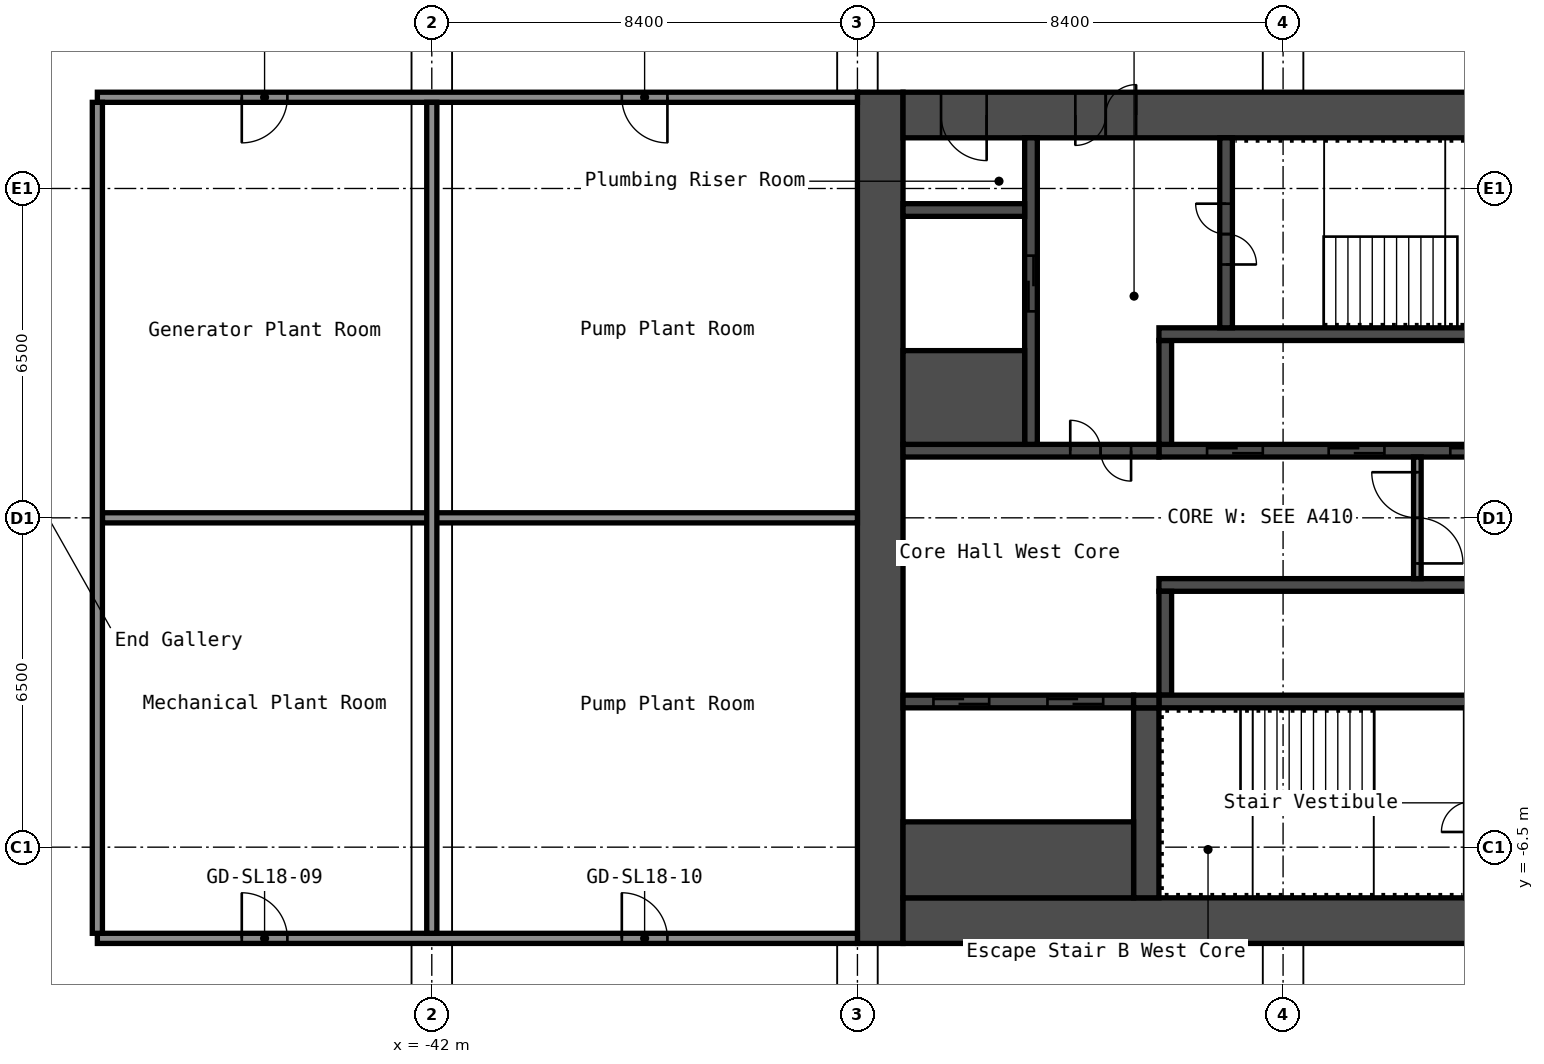
"""IFC4 building model, lengths in metres.
Left out: names, types, materials, properties, quantities, classifications, styles, units other than length and angle.
Written with IfcOpenShell. Run it as: python <this file> out.ifc"""

import sys

from ifc_helpers import new_model, si_unit, direction, frame, frame_2d, origin, place, context, subcontext, project, spatial, rectangle, extrude, element, fill, save


model = new_model("IFC4")
c1 = context("Model", 3, precision=1e-05, world=origin(), true_north=direction((0.0, 1.0)))
c2 = subcontext(c1, "Body", "Model", "MODEL_VIEW")
j1 = project(units=[si_unit("LENGTHUNIT", "METRE"), si_unit("PLANEANGLEUNIT", "RADIAN")], contexts=[c1])
p1 = place(None, origin())
s1 = spatial("IfcSite", under=j1, at=p1, CompositionType="ELEMENT")
p2 = place(p1, origin())
s2 = spatial("IfcBuilding", under=s1, at=p2, CompositionType="ELEMENT")
p3 = place(p2, frame((0.0, 0.0, 64.6)))
s3 = spatial("IfcBuildingStorey", under=s2, at=p3, CompositionType="ELEMENT", Elevation=64.6)
p4 = place(p3, frame((-33.15, -8.4, 0.0), z_axis=(0.0, 0.0, 1.0), x_axis=(0.0, 1.0, 0.0)))
e1 = element("IfcWall", 1, at=p4, inside=s3, PredefinedType="SHEAR", context=c2, shape_type="SweptSolid", body=[
    extrude(rectangle(XDim=16.8, YDim=0.9, at=frame_2d((8.4, 0.0))), origin(), (0.0, 0.0, 1.0), 4.1),
])
p5 = place(p3, frame((-32.7, 7.95, 0.0), z_axis=(0.0, 0.0, 1.0), x_axis=(1.0, 0.0, 0.0)))
e2 = element("IfcWall", 2, at=p5, inside=s3, PredefinedType="SHEAR", context=c2, shape_type="SweptSolid", body=[
    extrude(rectangle(XDim=15.0, YDim=0.9, at=frame_2d((7.5, 0.0))), origin(), (0.0, 0.0, 1.0), 4.1),
])
p6 = place(p5, frame((3.4, 0.0, 0.0)))
e3 = element("IfcOpeningElement", 3, at=p6, cuts=e2, PredefinedType="OPENING", context=c2, shape_type="SweptSolid", body=[
    extrude(rectangle(XDim=1.2, YDim=2.1, at=frame_2d((0.6, 1.05))), frame((0.0, 0.46, 0.0), z_axis=(0.0, -1.0, 0.0), x_axis=(1.0, 0.0, 0.0)), (0.0, 0.0, 1.0), 0.92),
])
p7 = place(p5, frame((0.75, 0.0, 0.0)))
e4 = element("IfcOpeningElement", 4, at=p7, cuts=e2, PredefinedType="OPENING", context=c2, shape_type="SweptSolid", body=[
    extrude(rectangle(XDim=0.9, YDim=2.1, at=frame_2d((0.45, 1.05))), frame((0.0, 0.46, 0.0), z_axis=(0.0, -1.0, 0.0), x_axis=(1.0, 0.0, 0.0)), (0.0, 0.0, 1.0), 0.92),
])
p8 = place(p3, frame((-32.7, -7.95, 0.0), z_axis=(0.0, 0.0, 1.0), x_axis=(1.0, 0.0, 0.0)))
e5 = element("IfcWall", 5, at=p8, inside=s3, PredefinedType="SHEAR", context=c2, shape_type="SweptSolid", body=[
    extrude(rectangle(XDim=15.0, YDim=0.9, at=frame_2d((7.5, 0.0))), origin(), (0.0, 0.0, 1.0), 4.1),
])
p9 = place(p8, frame((11.45, 0.0, 0.0)))
e6 = element("IfcOpeningElement", 6, at=p9, cuts=e5, PredefinedType="OPENING", context=c2, shape_type="SweptSolid", body=[
    extrude(rectangle(XDim=1.0, YDim=2.1, at=frame_2d((0.5, 1.05))), frame((0.0, 0.46, 0.0), z_axis=(0.0, -1.0, 0.0), x_axis=(1.0, 0.0, 0.0)), (0.0, 0.0, 1.0), 0.92),
])
p10 = place(p3, frame((-27.65, 1.325, 0.0), z_axis=(0.0, 0.0, 1.0), x_axis=(1.0, 0.0, 0.0)))
e7 = element("IfcWall", 7, at=p10, inside=s3, PredefinedType="SHEAR", context=c2, shape_type="SweptSolid", body=[
    extrude(rectangle(XDim=7.5, YDim=0.25, at=frame_2d((3.75, 0.0))), origin(), (0.0, 0.0, 1.0), 4.1),
])
p11 = place(p10, frame((5.75, 0.0, 0.0)))
e8 = element("IfcOpeningElement", 8, at=p11, cuts=e7, PredefinedType="OPENING", context=c2, shape_type="SweptSolid", body=[
    extrude(rectangle(XDim=1.1, YDim=2.1, at=frame_2d((0.55, 1.05))), frame((0.0, 0.135, 0.0), z_axis=(0.0, -1.0, 0.0), x_axis=(1.0, 0.0, 0.0)), (0.0, 0.0, 1.0), 0.27),
])
p12 = place(p10, frame((3.35, 0.0, 0.0)))
e9 = element("IfcOpeningElement", 9, at=p12, cuts=e7, PredefinedType="OPENING", context=c2, shape_type="SweptSolid", body=[
    extrude(rectangle(XDim=1.1, YDim=2.1, at=frame_2d((0.55, 1.05))), frame((0.0, 0.135, 0.0), z_axis=(0.0, -1.0, 0.0), x_axis=(1.0, 0.0, 0.0)), (0.0, 0.0, 1.0), 0.27),
])
p13 = place(p10, frame((0.95, 0.0, 0.0)))
e10 = element("IfcOpeningElement", 10, at=p13, cuts=e7, PredefinedType="OPENING", context=c2, shape_type="SweptSolid", body=[
    extrude(rectangle(XDim=1.1, YDim=2.1, at=frame_2d((0.55, 1.05))), frame((0.0, 0.135, 0.0), z_axis=(0.0, -1.0, 0.0), x_axis=(1.0, 0.0, 0.0)), (0.0, 0.0, 1.0), 0.27),
])
p14 = place(p3, frame((-27.525, 1.45, 0.0), z_axis=(0.0, 0.0, 1.0), x_axis=(0.0, 1.0, 0.0)))
e11 = element("IfcWall", 11, at=p14, inside=s3, PredefinedType="SHEAR", context=c2, shape_type="SweptSolid", body=[
    extrude(rectangle(XDim=2.05, YDim=0.25, at=frame_2d((1.025, 0.0))), origin(), (0.0, 0.0, 1.0), 4.1),
])
p15 = place(p3, frame((-27.65, 3.625, 0.0), z_axis=(0.0, 0.0, 1.0), x_axis=(1.0, 0.0, 0.0)))
e12 = element("IfcWall", 12, at=p15, inside=s3, PredefinedType="SHEAR", context=c2, shape_type="SweptSolid", body=[
    extrude(rectangle(XDim=7.5, YDim=0.25, at=frame_2d((3.75, 0.0))), origin(), (0.0, 0.0, 1.0), 4.1),
])
p16 = place(p3, frame((-26.325, 3.75, 0.0), z_axis=(0.0, 0.0, 1.0), x_axis=(0.0, 1.0, 0.0)))
e13 = element("IfcWall", 13, at=p16, inside=s3, PredefinedType="SHEAR", context=c2, shape_type="SweptSolid", body=[
    extrude(rectangle(XDim=3.75, YDim=0.25, at=frame_2d((1.875, 0.0))), origin(), (0.0, 0.0, 1.0), 4.1),
])
p17 = place(p16, frame((1.25, 0.0, 0.0)))
e14 = element("IfcOpeningElement", 14, at=p17, cuts=e13, PredefinedType="OPENING", context=c2, shape_type="SweptSolid", body=[
    extrude(rectangle(XDim=1.2, YDim=2.1, at=frame_2d((0.6, 1.05))), frame((0.0, 0.135, 0.0), z_axis=(0.0, -1.0, 0.0), x_axis=(1.0, 0.0, 0.0)), (0.0, 0.0, 1.0), 0.27),
])
p18 = place(p3, frame((-32.7, 1.325, 0.0), z_axis=(0.0, 0.0, 1.0), x_axis=(1.0, 0.0, 0.0)))
e15 = element("IfcWall", 15, at=p18, inside=s3, PredefinedType="SHEAR", context=c2, shape_type="SweptSolid", body=[
    extrude(rectangle(XDim=5.05, YDim=0.25, at=frame_2d((2.525, 0.0))), origin(), (0.0, 0.0, 1.0), 4.1),
])
p19 = place(p18, frame((3.3, 0.0, 0.0)))
e16 = element("IfcOpeningElement", 16, at=p19, cuts=e15, PredefinedType="OPENING", context=c2, shape_type="SweptSolid", body=[
    extrude(rectangle(XDim=1.2, YDim=2.1, at=frame_2d((0.6, 1.05))), frame((0.0, 0.135, 0.0), z_axis=(0.0, -1.0, 0.0), x_axis=(1.0, 0.0, 0.0)), (0.0, 0.0, 1.0), 0.27),
])
p20 = place(p3, frame((-30.175, 1.45, 0.0), z_axis=(0.0, 0.0, 1.0), x_axis=(0.0, 1.0, 0.0)))
e17 = element("IfcWall", 17, at=p20, inside=s3, PredefinedType="SHEAR", context=c2, shape_type="SweptSolid", body=[
    extrude(rectangle(XDim=6.05, YDim=0.25, at=frame_2d((3.025, 0.0))), origin(), (0.0, 0.0, 1.0), 4.1),
])
p21 = place(p20, frame((2.625, 0.0, 0.0)))
e18 = element("IfcOpeningElement", 18, at=p21, cuts=e17, PredefinedType="OPENING", context=c2, shape_type="SweptSolid", body=[
    extrude(rectangle(XDim=1.1, YDim=2.1, at=frame_2d((0.55, 1.05))), frame((0.0, 0.135, 0.0), z_axis=(0.0, -1.0, 0.0), x_axis=(1.0, 0.0, 0.0)), (0.0, 0.0, 1.0), 0.27),
])
p22 = place(p3, frame((-32.7, 2.375, 0.0), z_axis=(0.0, 0.0, 1.0), x_axis=(1.0, 0.0, 0.0)))
e19 = element("IfcWall", 19, at=p22, inside=s3, PredefinedType="SHEAR", context=c2, shape_type="SweptSolid", body=[
    extrude(rectangle(XDim=2.4, YDim=1.85, at=frame_2d((1.2, 0.0))), origin(), (0.0, 0.0, 1.0), 4.1),
])
p23 = place(p3, frame((-32.7, 6.075, 0.0), z_axis=(0.0, 0.0, 1.0), x_axis=(1.0, 0.0, 0.0)))
e20 = element("IfcWall", 20, at=p23, inside=s3, PredefinedType="SHEAR", context=c2, shape_type="SweptSolid", body=[
    extrude(rectangle(XDim=2.4, YDim=0.25, at=frame_2d((1.2, 0.0))), origin(), (0.0, 0.0, 1.0), 4.1),
])
p24 = place(p3, frame((-27.65, -1.325, 0.0), z_axis=(0.0, 0.0, 1.0), x_axis=(1.0, 0.0, 0.0)))
e21 = element("IfcWall", 21, at=p24, inside=s3, PredefinedType="SHEAR", context=c2, shape_type="SweptSolid", body=[
    extrude(rectangle(XDim=7.5, YDim=0.25, at=frame_2d((3.75, 0.0))), origin(), (0.0, 0.0, 1.0), 4.1),
])
p25 = place(p3, frame((-27.525, -3.5, 0.0), z_axis=(0.0, 0.0, 1.0), x_axis=(0.0, 1.0, 0.0)))
e22 = element("IfcWall", 22, at=p25, inside=s3, PredefinedType="SHEAR", context=c2, shape_type="SweptSolid", body=[
    extrude(rectangle(XDim=2.05, YDim=0.25, at=frame_2d((1.025, 0.0))), origin(), (0.0, 0.0, 1.0), 4.1),
])
p26 = place(p3, frame((-27.65, -3.625, 0.0), z_axis=(0.0, 0.0, 1.0), x_axis=(1.0, 0.0, 0.0)))
e23 = element("IfcWall", 23, at=p26, inside=s3, PredefinedType="SHEAR", context=c2, shape_type="SweptSolid", body=[
    extrude(rectangle(XDim=7.5, YDim=0.25, at=frame_2d((3.75, 0.0))), origin(), (0.0, 0.0, 1.0), 4.1),
])
p27 = place(p3, frame((-27.9, -7.5, 0.0), z_axis=(0.0, 0.0, 1.0), x_axis=(0.0, 1.0, 0.0)))
e24 = element("IfcWall", 24, at=p27, inside=s3, PredefinedType="SHEAR", context=c2, shape_type="SweptSolid", body=[
    extrude(rectangle(XDim=3.75, YDim=0.5, at=frame_2d((1.875, 0.0))), origin(), (0.0, 0.0, 1.0), 4.1),
])
p28 = place(p3, frame((-32.7, -3.625, 0.0), z_axis=(0.0, 0.0, 1.0), x_axis=(1.0, 0.0, 0.0)))
e25 = element("IfcWall", 25, at=p28, inside=s3, PredefinedType="SHEAR", context=c2, shape_type="SweptSolid", body=[
    extrude(rectangle(XDim=4.55, YDim=0.25, at=frame_2d((2.275, 0.0))), origin(), (0.0, 0.0, 1.0), 4.1),
])
p29 = place(p28, frame((2.85, 0.0, 0.0)))
e26 = element("IfcOpeningElement", 26, at=p29, cuts=e25, PredefinedType="OPENING", context=c2, shape_type="SweptSolid", body=[
    extrude(rectangle(XDim=1.1, YDim=2.1, at=frame_2d((0.55, 1.05))), frame((0.0, 0.135, 0.0), z_axis=(0.0, -1.0, 0.0), x_axis=(1.0, 0.0, 0.0)), (0.0, 0.0, 1.0), 0.27),
])
p30 = place(p28, frame((0.6, 0.0, 0.0)))
e27 = element("IfcOpeningElement", 27, at=p30, cuts=e25, PredefinedType="OPENING", context=c2, shape_type="SweptSolid", body=[
    extrude(rectangle(XDim=1.1, YDim=2.1, at=frame_2d((0.55, 1.05))), frame((0.0, 0.135, 0.0), z_axis=(0.0, -1.0, 0.0), x_axis=(1.0, 0.0, 0.0)), (0.0, 0.0, 1.0), 0.27),
])
p31 = place(p3, frame((-32.7, -6.75, 0.0), z_axis=(0.0, 0.0, 1.0), x_axis=(1.0, 0.0, 0.0)))
e28 = element("IfcWall", 28, at=p31, inside=s3, PredefinedType="SHEAR", context=c2, shape_type="SweptSolid", body=[
    extrude(rectangle(XDim=4.55, YDim=1.5, at=frame_2d((2.275, 0.0))), origin(), (0.0, 0.0, 1.0), 4.1),
])
p32 = place(p3, frame((-28.15, -3.625, 0.0), z_axis=(0.0, 0.0, 1.0), x_axis=(1.0, 0.0, 0.0)))
e29 = element("IfcWall", 29, at=p32, inside=s3, PredefinedType="SHEAR", context=c2, shape_type="SweptSolid", body=[
    extrude(rectangle(XDim=0.5, YDim=0.25, at=frame_2d((0.25, 0.0))), origin(), (0.0, 0.0, 1.0), 4.1),
])
p33 = place(p3, frame((-22.55, -1.2, 0.0), z_axis=(0.0, 0.0, 1.0), x_axis=(0.0, 1.0, 0.0)))
e30 = element("IfcWall", 30, at=p33, inside=s3, PredefinedType="PARTITIONING", context=c2, shape_type="SweptSolid", body=[
    extrude(rectangle(XDim=2.4, YDim=0.15, at=frame_2d((1.2, 0.0))), origin(), (0.0, 0.0, 1.0), 4.1),
])
p34 = place(p33, frame((0.3, 0.0, 0.0)))
e31 = element("IfcOpeningElement", 31, at=p34, cuts=e30, PredefinedType="OPENING", context=c2, shape_type="SweptSolid", body=[
    extrude(rectangle(XDim=1.8, YDim=2.1, at=frame_2d((0.9, 1.05))), frame((0.0, 0.085, 0.0), z_axis=(0.0, -1.0, 0.0), x_axis=(1.0, 0.0, 0.0)), (0.0, 0.0, 1.0), 0.17),
])
p35 = place(p3, frame((-48.6, -8.3, 0.0), z_axis=(0.0, 0.0, 1.0), x_axis=(1.0, 0.0, 0.0)))
e32 = element("IfcWall", 32, at=p35, inside=s3, PredefinedType="PARTITIONING", context=c2, shape_type="SweptSolid", body=[
    extrude(rectangle(XDim=15.0, YDim=0.2, at=frame_2d((7.5, 0.0))), origin(), (0.0, 0.0, 1.0), 4.1),
])
p36 = place(p35, frame((2.85, 0.0, 0.0)))
e33 = element("IfcOpeningElement", 33, at=p36, cuts=e32, PredefinedType="OPENING", context=c2, shape_type="SweptSolid", body=[
    extrude(rectangle(XDim=0.9, YDim=2.1, at=frame_2d((0.45, 1.05))), frame((0.0, 0.11, 0.0), z_axis=(0.0, -1.0, 0.0), x_axis=(1.0, 0.0, 0.0)), (0.0, 0.0, 1.0), 0.22),
])
p37 = place(p35, frame((10.35, 0.0, 0.0)))
e34 = element("IfcOpeningElement", 34, at=p37, cuts=e32, PredefinedType="OPENING", context=c2, shape_type="SweptSolid", body=[
    extrude(rectangle(XDim=0.9, YDim=2.1, at=frame_2d((0.45, 1.05))), frame((0.0, 0.11, 0.0), z_axis=(0.0, -1.0, 0.0), x_axis=(1.0, 0.0, 0.0)), (0.0, 0.0, 1.0), 0.22),
])
p38 = place(p3, frame((-48.5, 0.0, 0.0), z_axis=(0.0, 0.0, 1.0), x_axis=(1.0, 0.0, 0.0)))
e35 = element("IfcWall", 35, at=p38, inside=s3, PredefinedType="PARTITIONING", context=c2, shape_type="SweptSolid", body=[
    extrude(rectangle(XDim=14.9, YDim=0.2, at=frame_2d((7.45, 0.0))), origin(), (0.0, 0.0, 1.0), 4.1),
])
p39 = place(p3, frame((-48.6, 8.3, 0.0), z_axis=(0.0, 0.0, 1.0), x_axis=(1.0, 0.0, 0.0)))
e36 = element("IfcWall", 36, at=p39, inside=s3, PredefinedType="PARTITIONING", context=c2, shape_type="SweptSolid", body=[
    extrude(rectangle(XDim=15.0, YDim=0.2, at=frame_2d((7.5, 0.0))), origin(), (0.0, 0.0, 1.0), 4.1),
])
p40 = place(p39, frame((2.85, 0.0, 0.0)))
e37 = element("IfcOpeningElement", 37, at=p40, cuts=e36, PredefinedType="OPENING", context=c2, shape_type="SweptSolid", body=[
    extrude(rectangle(XDim=0.9, YDim=2.1, at=frame_2d((0.45, 1.05))), frame((0.0, 0.11, 0.0), z_axis=(0.0, -1.0, 0.0), x_axis=(1.0, 0.0, 0.0)), (0.0, 0.0, 1.0), 0.22),
])
p41 = place(p39, frame((10.35, 0.0, 0.0)))
e38 = element("IfcOpeningElement", 38, at=p41, cuts=e36, PredefinedType="OPENING", context=c2, shape_type="SweptSolid", body=[
    extrude(rectangle(XDim=0.9, YDim=2.1, at=frame_2d((0.45, 1.05))), frame((0.0, 0.11, 0.0), z_axis=(0.0, -1.0, 0.0), x_axis=(1.0, 0.0, 0.0)), (0.0, 0.0, 1.0), 0.22),
])
for number, where, z_axis, x_axis in (
    (39, (-48.6, -8.2, 0.0), (0.0, 0.0, 1.0), (0.0, 1.0, 0.0)),
    (40, (-42.0, -8.2, 0.0), (0.0, 0.0, 1.0), (0.0, 1.0, 0.0)),
):
    element("IfcWall", number, at=place(p3, frame(where, z_axis=z_axis, x_axis=x_axis)), inside=s3, PredefinedType="PARTITIONING", context=c2, shape_type="SweptSolid", body=[
        extrude(rectangle(XDim=16.4, YDim=0.2, at=frame_2d((8.2, 0.0))), origin(), (0.0, 0.0, 1.0), 4.1),
    ])
p42 = place(p6, origin())
e41 = element("IfcDoor", 41, at=p42, inside=s3, OperationType="DOUBLE_DOOR_SINGLE_SWING", PredefinedType="DOOR", context=c2, shape_type="SweptSolid", body=[
    extrude(rectangle(XDim=1.2, YDim=2.1, at=frame_2d((0.6, 1.05))), frame((0.0, 0.025, 0.0), z_axis=(0.0, -1.0, 0.0), x_axis=(1.0, 0.0, 0.0)), (0.0, 0.0, 1.0), 0.05),
])
fill(e3, e41)
p43 = place(p7, origin())
e42 = element("IfcDoor", 42, at=p43, inside=s3, OperationType="SINGLE_SWING_RIGHT", PredefinedType="DOOR", context=c2, shape_type="SweptSolid", body=[
    extrude(rectangle(XDim=0.9, YDim=2.1, at=frame_2d((0.45, 1.05))), frame((0.0, 0.025, 0.0), z_axis=(0.0, -1.0, 0.0), x_axis=(1.0, 0.0, 0.0)), (0.0, 0.0, 1.0), 0.05),
])
fill(e4, e42)
p44 = place(p17, origin())
e43 = element("IfcDoor", 43, at=p44, inside=s3, OperationType="DOUBLE_DOOR_SINGLE_SWING", PredefinedType="DOOR", context=c2, shape_type="SweptSolid", body=[
    extrude(rectangle(XDim=1.2, YDim=2.1, at=frame_2d((0.6, 1.05))), frame((0.0, 0.025, 0.0), z_axis=(0.0, -1.0, 0.0), x_axis=(1.0, 0.0, 0.0)), (0.0, 0.0, 1.0), 0.05),
])
fill(e14, e43)
p45 = place(p19, origin())
e44 = element("IfcDoor", 44, at=p45, inside=s3, OperationType="DOUBLE_DOOR_SINGLE_SWING", PredefinedType="DOOR", context=c2, shape_type="SweptSolid", body=[
    extrude(rectangle(XDim=1.2, YDim=2.1, at=frame_2d((0.6, 1.05))), frame((0.0, 0.025, 0.0), z_axis=(0.0, -1.0, 0.0), x_axis=(1.0, 0.0, 0.0)), (0.0, 0.0, 1.0), 0.05),
])
fill(e16, e44)
p46 = place(p34, origin())
e45 = element("IfcDoor", 45, at=p46, inside=s3, OperationType="DOUBLE_DOOR_SINGLE_SWING", PredefinedType="DOOR", context=c2, shape_type="SweptSolid", body=[
    extrude(rectangle(XDim=1.8, YDim=2.1, at=frame_2d((0.9, 1.05))), frame((0.0, 0.025, 0.0), z_axis=(0.0, -1.0, 0.0), x_axis=(1.0, 0.0, 0.0)), (0.0, 0.0, 1.0), 0.05),
])
fill(e31, e45)
p47 = place(p11, origin())
e46 = element("IfcDoor", 46, at=p47, inside=s3, OperationType="DOUBLE_DOOR_SLIDING", PredefinedType="DOOR", context=c2, shape_type="SweptSolid", body=[
    extrude(rectangle(XDim=1.1, YDim=2.1, at=frame_2d((0.55, 1.05))), frame((0.0, 0.025, 0.0), z_axis=(0.0, -1.0, 0.0), x_axis=(1.0, 0.0, 0.0)), (0.0, 0.0, 1.0), 0.05),
])
fill(e8, e46)
p48 = place(p12, origin())
e47 = element("IfcDoor", 47, at=p48, inside=s3, OperationType="DOUBLE_DOOR_SLIDING", PredefinedType="DOOR", context=c2, shape_type="SweptSolid", body=[
    extrude(rectangle(XDim=1.1, YDim=2.1, at=frame_2d((0.55, 1.05))), frame((0.0, 0.025, 0.0), z_axis=(0.0, -1.0, 0.0), x_axis=(1.0, 0.0, 0.0)), (0.0, 0.0, 1.0), 0.05),
])
fill(e9, e47)
p49 = place(p13, origin())
e48 = element("IfcDoor", 48, at=p49, inside=s3, OperationType="DOUBLE_DOOR_SLIDING", PredefinedType="DOOR", context=c2, shape_type="SweptSolid", body=[
    extrude(rectangle(XDim=1.1, YDim=2.1, at=frame_2d((0.55, 1.05))), frame((0.0, 0.025, 0.0), z_axis=(0.0, -1.0, 0.0), x_axis=(1.0, 0.0, 0.0)), (0.0, 0.0, 1.0), 0.05),
])
fill(e10, e48)
p50 = place(p21, origin())
e49 = element("IfcDoor", 49, at=p50, inside=s3, OperationType="DOUBLE_DOOR_SLIDING", PredefinedType="DOOR", context=c2, shape_type="SweptSolid", body=[
    extrude(rectangle(XDim=1.1, YDim=2.1, at=frame_2d((0.55, 1.05))), frame((0.0, 0.025, 0.0), z_axis=(0.0, -1.0, 0.0), x_axis=(1.0, 0.0, 0.0)), (0.0, 0.0, 1.0), 0.05),
])
fill(e18, e49)
p51 = place(p29, origin())
e50 = element("IfcDoor", 50, at=p51, inside=s3, OperationType="DOUBLE_DOOR_SLIDING", PredefinedType="DOOR", context=c2, shape_type="SweptSolid", body=[
    extrude(rectangle(XDim=1.1, YDim=2.1, at=frame_2d((0.55, 1.05))), frame((0.0, 0.025, 0.0), z_axis=(0.0, -1.0, 0.0), x_axis=(1.0, 0.0, 0.0)), (0.0, 0.0, 1.0), 0.05),
])
fill(e26, e50)
p52 = place(p30, origin())
e51 = element("IfcDoor", 51, at=p52, inside=s3, OperationType="DOUBLE_DOOR_SLIDING", PredefinedType="DOOR", context=c2, shape_type="SweptSolid", body=[
    extrude(rectangle(XDim=1.1, YDim=2.1, at=frame_2d((0.55, 1.05))), frame((0.0, 0.025, 0.0), z_axis=(0.0, -1.0, 0.0), x_axis=(1.0, 0.0, 0.0)), (0.0, 0.0, 1.0), 0.05),
])
fill(e27, e51)
p53 = place(p36, origin())
e52 = element("IfcDoor", 52, at=p53, inside=s3, OperationType="SINGLE_SWING_RIGHT", PredefinedType="DOOR", context=c2, shape_type="SweptSolid", body=[
    extrude(rectangle(XDim=0.9, YDim=2.1, at=frame_2d((0.45, 1.05))), frame((0.0, 0.025, 0.0), z_axis=(0.0, -1.0, 0.0), x_axis=(1.0, 0.0, 0.0)), (0.0, 0.0, 1.0), 0.05),
])
fill(e33, e52)
p54 = place(p37, origin())
e53 = element("IfcDoor", 53, at=p54, inside=s3, OperationType="SINGLE_SWING_RIGHT", PredefinedType="DOOR", context=c2, shape_type="SweptSolid", body=[
    extrude(rectangle(XDim=0.9, YDim=2.1, at=frame_2d((0.45, 1.05))), frame((0.0, 0.025, 0.0), z_axis=(0.0, -1.0, 0.0), x_axis=(1.0, 0.0, 0.0)), (0.0, 0.0, 1.0), 0.05),
])
fill(e34, e53)
p55 = place(p40, origin())
e54 = element("IfcDoor", 54, at=p55, inside=s3, OperationType="SINGLE_SWING_LEFT", PredefinedType="DOOR", context=c2, shape_type="SweptSolid", body=[
    extrude(rectangle(XDim=0.9, YDim=2.1, at=frame_2d((0.45, 1.05))), frame((0.0, 0.025, 0.0), z_axis=(0.0, -1.0, 0.0), x_axis=(1.0, 0.0, 0.0)), (0.0, 0.0, 1.0), 0.05),
])
fill(e37, e54)
p56 = place(p41, origin())
e55 = element("IfcDoor", 55, at=p56, inside=s3, OperationType="SINGLE_SWING_RIGHT", PredefinedType="DOOR", context=c2, shape_type="SweptSolid", body=[
    extrude(rectangle(XDim=0.9, YDim=2.1, at=frame_2d((0.45, 1.05))), frame((0.0, 0.025, 0.0), z_axis=(0.0, -1.0, 0.0), x_axis=(1.0, 0.0, 0.0)), (0.0, 0.0, 1.0), 0.05),
])
fill(e38, e55)
save(model, sys.argv[1])
